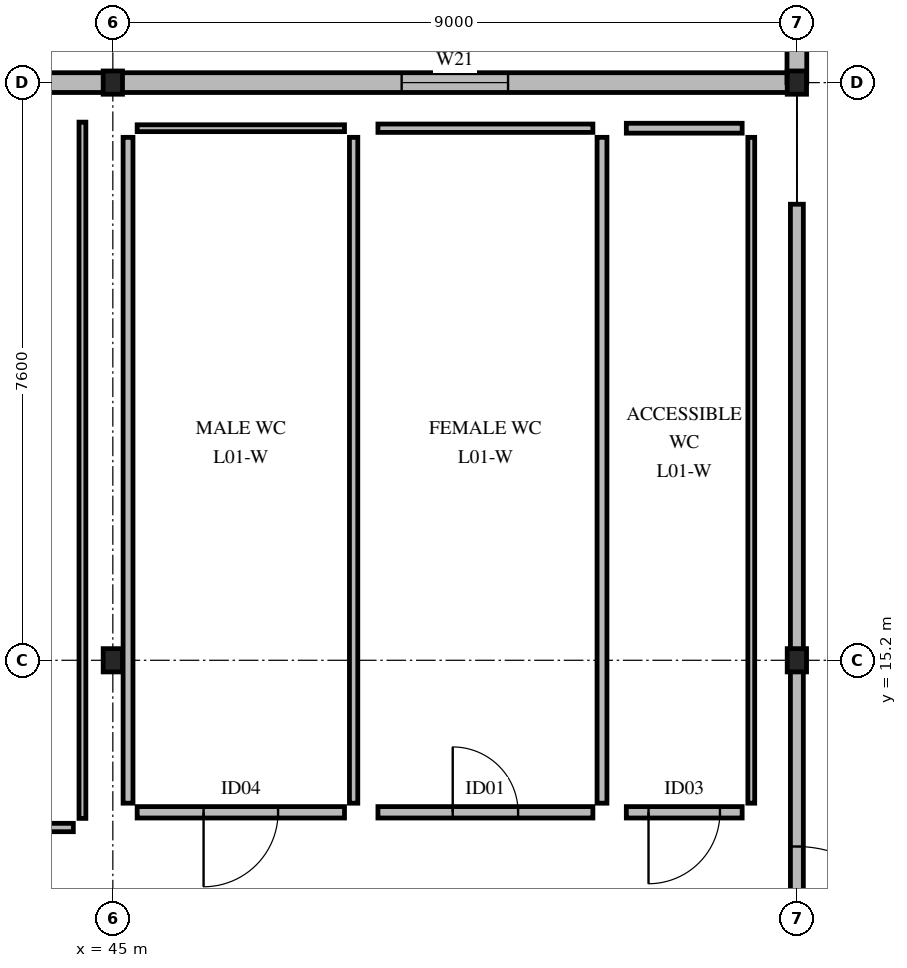
"""IFC4 building model, lengths in metres.
Left out: names, types, materials, properties, quantities, classifications, styles, units other than length and angle.
Written with IfcOpenShell. Run it as: python <this file> out.ifc"""

import sys

from ifc_helpers import new_model, si_unit, direction, frame, frame_2d, origin, origin_2d, place, context, subcontext, project, spatial, rectangle, i_section, extrude, element, fill, save


model = new_model("IFC4")
c1 = context("Model", 3, precision=1e-05, world=origin(), true_north=direction((0.0, 1.0)))
c2 = subcontext(c1, "Body", "Model", "MODEL_VIEW")
j1 = project(units=[si_unit("LENGTHUNIT", "METRE"), si_unit("PLANEANGLEUNIT", "RADIAN")], contexts=[c1])
p1 = place(None, origin())
s1 = spatial("IfcSite", under=j1, at=p1, CompositionType="ELEMENT")
p2 = place(p1, origin())
s2 = spatial("IfcBuilding", under=s1, at=p2, CompositionType="ELEMENT")
p3 = place(p2, frame((0.0, 0.0, 5.04)))
s3 = spatial("IfcBuildingStorey", under=s2, at=p3, CompositionType="ELEMENT", Elevation=5.04)
for number, where, z_axis, x_axis in (
    (1, (45.0, 15.2, 0.0), (0.0, 0.0, 1.0), (1.0, 0.0, 0.0)),
    (2, (45.0, 22.8, 0.0), (0.0, 0.0, 1.0), (1.0, 0.0, 0.0)),
    (3, (54.0, 15.2, 0.0), (0.0, 0.0, 1.0), (1.0, 0.0, 0.0)),
    (4, (54.0, 22.8, 0.0), (0.0, 0.0, 1.0), (1.0, 0.0, 0.0)),
):
    element("IfcColumn", number, at=place(p3, frame(where, z_axis=z_axis, x_axis=x_axis)), inside=s3, PredefinedType="COLUMN", context=c2, shape_type="SweptSolid", body=[
        extrude(i_section(OverallWidth=0.254, OverallDepth=0.306, WebThickness=0.009, FlangeThickness=0.015, FilletRadius=0.015, at=origin_2d()), origin(), (0.0, 0.0, 1.0), 4.32),
    ])
p4 = place(p3, frame((36.0, 22.8, 0.0), z_axis=(0.0, 0.0, 1.0), x_axis=(1.0, 0.0, 0.0)))
e5 = element("IfcWall", 5, at=p4, inside=s3, PredefinedType="STANDARD", context=c2, shape_type="SweptSolid", body=[
    extrude(rectangle(XDim=9.0, YDim=0.26, at=frame_2d((4.5, 0.0))), origin(), (0.0, 0.0, 1.0), 3.641),
])
p5 = place(p3, frame((45.0, 22.8, 0.0), z_axis=(0.0, 0.0, 1.0), x_axis=(1.0, 0.0, 0.0)))
e6 = element("IfcWall", 6, at=p5, inside=s3, PredefinedType="STANDARD", context=c2, shape_type="SweptSolid", body=[
    extrude(rectangle(XDim=9.0, YDim=0.26, at=frame_2d((4.5, 0.0))), origin(), (0.0, 0.0, 1.0), 3.641),
])
p6 = place(p5, frame((3.8, 0.0, 0.85)))
e7 = element("IfcOpeningElement", 7, at=p6, cuts=e6, PredefinedType="OPENING", context=c2, shape_type="SweptSolid", body=[
    extrude(rectangle(XDim=1.4, YDim=1.5, at=frame_2d((0.7, 0.75))), frame((0.0, 0.14, 0.0), z_axis=(0.0, -1.0, 0.0), x_axis=(1.0, 0.0, 0.0)), (0.0, 0.0, 1.0), 0.28),
])
p7 = place(p3, frame((54.0, 22.8, 0.0), z_axis=(0.0, 0.0, 1.0), x_axis=(0.0, 1.0, 0.0)))
e8 = element("IfcWall", 8, at=p7, inside=s3, PredefinedType="STANDARD", context=c2, shape_type="SweptSolid", body=[
    extrude(rectangle(XDim=7.81, YDim=0.26, at=frame_2d((3.905, 0.0))), origin(), (0.0, 0.0, 1.0), 3.629),
])
p8 = place(p7, frame((2.825, 0.0, 0.85)))
e9 = element("IfcOpeningElement", 9, at=p8, cuts=e8, PredefinedType="OPENING", context=c2, shape_type="SweptSolid", body=[
    extrude(rectangle(XDim=1.95, YDim=1.35, at=frame_2d((0.975, 0.675))), frame((0.0, 0.14, 0.0), z_axis=(0.0, -1.0, 0.0), x_axis=(1.0, 0.0, 0.0)), (0.0, 0.0, 1.0), 0.28),
])
p9 = place(p3, frame((54.0, 9.2, 0.0), z_axis=(0.0, 0.0, 1.0), x_axis=(0.0, 1.0, 0.0)))
e10 = element("IfcWall", 10, at=p9, inside=s3, PredefinedType="PARTITIONING", context=c2, shape_type="SweptSolid", body=[
    extrude(rectangle(XDim=12.0, YDim=0.17, at=frame_2d((6.0, 0.0))), origin(), (0.0, 0.0, 1.0), 3.599),
])
p10 = place(p9, frame((2.0, 0.0, 0.0)))
e11 = element("IfcOpeningElement", 11, at=p10, cuts=e10, PredefinedType="OPENING", context=c2, shape_type="SweptSolid", body=[
    extrude(rectangle(XDim=1.55, YDim=2.2, at=frame_2d((0.775, 1.1))), frame((0.0, 0.095, 0.0), z_axis=(0.0, -1.0, 0.0), x_axis=(1.0, 0.0, 0.0)), (0.0, 0.0, 1.0), 0.19),
])
p11 = place(p3, frame((0.52, 13.0, 0.0), z_axis=(0.0, 0.0, 1.0), x_axis=(1.0, 0.0, 0.0)))
e12 = element("IfcWall", 12, at=p11, inside=s3, PredefinedType="PARTITIONING", context=c2, shape_type="SweptSolid", body=[
    extrude(rectangle(XDim=43.96, YDim=0.11, at=frame_2d((21.98, 0.0))), origin(), (0.0, 0.0, 1.0), 4.04),
])
p12 = place(p11, frame((21.37, 0.0, 0.0)))
e13 = element("IfcOpeningElement", 13, at=p12, cuts=e12, PredefinedType="OPENING", context=c2, shape_type="SweptSolid", body=[
    extrude(rectangle(XDim=1.22, YDim=2.1, at=frame_2d((0.61, 1.05))), frame((0.0, 0.065, 0.0), z_axis=(0.0, -1.0, 0.0), x_axis=(1.0, 0.0, 0.0)), (0.0, 0.0, 1.0), 0.13),
])
p13 = place(p3, frame((44.6, 13.12, 0.0), z_axis=(0.0, 0.0, 1.0), x_axis=(0.0, 1.0, 0.0)))
e14 = element("IfcWall", 14, at=p13, inside=s3, PredefinedType="PARTITIONING", context=c2, shape_type="SweptSolid", body=[
    extrude(rectangle(XDim=9.16, YDim=0.09, at=frame_2d((4.58, 0.0))), origin(), (0.0, 0.0, 1.0), 4.04),
])
p14 = place(p3, frame((45.32, 13.2, 0.0), z_axis=(0.0, 0.0, 1.0), x_axis=(1.0, 0.0, 0.0)))
e15 = element("IfcWall", 15, at=p14, inside=s3, PredefinedType="PARTITIONING", context=c2, shape_type="SweptSolid", body=[
    extrude(rectangle(XDim=2.728, YDim=0.15, at=frame_2d((1.364, 0.0))), origin(), (0.0, 0.0, 1.0), 4.04),
])
p15 = place(p14, frame((0.874, 0.0, 0.0)))
e16 = element("IfcOpeningElement", 16, at=p15, cuts=e15, PredefinedType="OPENING", context=c2, shape_type="SweptSolid", body=[
    extrude(rectangle(XDim=0.98, YDim=2.06, at=frame_2d((0.49, 1.03))), frame((0.0, 0.085, 0.0), z_axis=(0.0, -1.0, 0.0), x_axis=(1.0, 0.0, 0.0)), (0.0, 0.0, 1.0), 0.17),
])
p16 = place(p3, frame((45.2, 13.32, 0.0), z_axis=(0.0, 0.0, 1.0), x_axis=(0.0, 1.0, 0.0)))
e17 = element("IfcWall", 17, at=p16, inside=s3, PredefinedType="PARTITIONING", context=c2, shape_type="SweptSolid", body=[
    extrude(rectangle(XDim=8.76, YDim=0.13, at=frame_2d((4.38, 0.0))), origin(), (0.0, 0.0, 1.0), 3.629),
])
p17 = place(p3, frame((48.168, 13.32, 0.0), z_axis=(0.0, 0.0, 1.0), x_axis=(0.0, 1.0, 0.0)))
e18 = element("IfcWall", 18, at=p17, inside=s3, PredefinedType="PARTITIONING", context=c2, shape_type="SweptSolid", body=[
    extrude(rectangle(XDim=8.76, YDim=0.11, at=frame_2d((4.38, 0.0))), origin(), (0.0, 0.0, 1.0), 4.04),
])
p18 = place(p3, frame((45.32, 22.2, 0.0), z_axis=(0.0, 0.0, 1.0), x_axis=(1.0, 0.0, 0.0)))
e19 = element("IfcWall", 19, at=p18, inside=s3, PredefinedType="PARTITIONING", context=c2, shape_type="SweptSolid", body=[
    extrude(rectangle(XDim=2.728, YDim=0.09, at=frame_2d((1.364, 0.0))), origin(), (0.0, 0.0, 1.0), 4.04),
])
p19 = place(p3, frame((48.488, 13.2, 0.0), z_axis=(0.0, 0.0, 1.0), x_axis=(1.0, 0.0, 0.0)))
e20 = element("IfcWall", 20, at=p19, inside=s3, PredefinedType="PARTITIONING", context=c2, shape_type="SweptSolid", body=[
    extrude(rectangle(XDim=2.828, YDim=0.15, at=frame_2d((1.414, 0.0))), origin(), (0.0, 0.0, 1.0), 4.04),
])
p20 = place(p19, frame((0.984, 0.0, 0.0)))
e21 = element("IfcOpeningElement", 21, at=p20, cuts=e20, PredefinedType="OPENING", context=c2, shape_type="SweptSolid", body=[
    extrude(rectangle(XDim=0.86, YDim=2.06, at=frame_2d((0.43, 1.03))), frame((0.0, 0.085, 0.0), z_axis=(0.0, -1.0, 0.0), x_axis=(1.0, 0.0, 0.0)), (0.0, 0.0, 1.0), 0.17),
])
p21 = place(p3, frame((51.436, 13.32, 0.0), z_axis=(0.0, 0.0, 1.0), x_axis=(0.0, 1.0, 0.0)))
e22 = element("IfcWall", 22, at=p21, inside=s3, PredefinedType="PARTITIONING", context=c2, shape_type="SweptSolid", body=[
    extrude(rectangle(XDim=8.76, YDim=0.13, at=frame_2d((4.38, 0.0))), origin(), (0.0, 0.0, 1.0), 4.04),
])
p22 = place(p3, frame((48.488, 22.2, 0.0), z_axis=(0.0, 0.0, 1.0), x_axis=(1.0, 0.0, 0.0)))
e23 = element("IfcWall", 23, at=p22, inside=s3, PredefinedType="PARTITIONING", context=c2, shape_type="SweptSolid", body=[
    extrude(rectangle(XDim=2.828, YDim=0.11, at=frame_2d((1.414, 0.0))), origin(), (0.0, 0.0, 1.0), 4.04),
])
p23 = place(p3, frame((53.4, 13.32, 0.0), z_axis=(0.0, 0.0, 1.0), x_axis=(0.0, 1.0, 0.0)))
e24 = element("IfcWall", 24, at=p23, inside=s3, PredefinedType="PARTITIONING", context=c2, shape_type="SweptSolid", body=[
    extrude(rectangle(XDim=8.76, YDim=0.09, at=frame_2d((4.38, 0.0))), origin(), (0.0, 0.0, 1.0), 4.04),
])
p24 = place(p3, frame((51.756, 13.2, 0.0), z_axis=(0.0, 0.0, 1.0), x_axis=(1.0, 0.0, 0.0)))
e25 = element("IfcWall", 25, at=p24, inside=s3, PredefinedType="PARTITIONING", context=c2, shape_type="SweptSolid", body=[
    extrude(rectangle(XDim=1.524, YDim=0.15, at=frame_2d((0.762, 0.0))), origin(), (0.0, 0.0, 1.0), 4.04),
])
p25 = place(p24, frame((0.292, 0.0, 0.0)))
e26 = element("IfcOpeningElement", 26, at=p25, cuts=e25, PredefinedType="OPENING", context=c2, shape_type="SweptSolid", body=[
    extrude(rectangle(XDim=0.94, YDim=2.06, at=frame_2d((0.47, 1.03))), frame((0.0, 0.085, 0.0), z_axis=(0.0, -1.0, 0.0), x_axis=(1.0, 0.0, 0.0)), (0.0, 0.0, 1.0), 0.17),
])
p26 = place(p3, frame((51.756, 22.2, 0.0), z_axis=(0.0, 0.0, 1.0), x_axis=(1.0, 0.0, 0.0)))
e27 = element("IfcWall", 27, at=p26, inside=s3, PredefinedType="PARTITIONING", context=c2, shape_type="SweptSolid", body=[
    extrude(rectangle(XDim=1.524, YDim=0.13, at=frame_2d((0.762, 0.0))), origin(), (0.0, 0.0, 1.0), 4.04),
])
p27 = place(p6, origin())
e28 = element("IfcWindow", 28, at=p27, inside=s3, PartitioningType="SINGLE_PANEL", PredefinedType="WINDOW", context=c2, shape_type="SweptSolid", body=[
    extrude(rectangle(XDim=1.4, YDim=1.5, at=frame_2d((0.7, 0.75))), frame((0.0, 0.03, 0.0), z_axis=(0.0, -1.0, 0.0), x_axis=(1.0, 0.0, 0.0)), (0.0, 0.0, 1.0), 0.06),
])
fill(e7, e28)
p28 = place(p10, origin())
e29 = element("IfcDoor", 29, at=p28, inside=s3, OperationType="SINGLE_SWING_RIGHT", PredefinedType="DOOR", context=c2, shape_type="SweptSolid", body=[
    extrude(rectangle(XDim=1.55, YDim=2.2, at=frame_2d((0.775, 1.1))), frame((0.0, 0.025, 0.0), z_axis=(0.0, -1.0, 0.0), x_axis=(1.0, 0.0, 0.0)), (0.0, 0.0, 1.0), 0.05),
])
fill(e11, e29)
p29 = place(p15, origin())
e30 = element("IfcDoor", 30, at=p29, inside=s3, OperationType="SINGLE_SWING_RIGHT", PredefinedType="DOOR", context=c2, shape_type="SweptSolid", body=[
    extrude(rectangle(XDim=0.98, YDim=2.06, at=frame_2d((0.49, 1.03))), frame((0.0, 0.025, 0.0), z_axis=(0.0, -1.0, 0.0), x_axis=(1.0, 0.0, 0.0)), (0.0, 0.0, 1.0), 0.05),
])
fill(e16, e30)
p30 = place(p20, origin())
e31 = element("IfcDoor", 31, at=p30, inside=s3, OperationType="SINGLE_SWING_LEFT", PredefinedType="DOOR", context=c2, shape_type="SweptSolid", body=[
    extrude(rectangle(XDim=0.86, YDim=2.06, at=frame_2d((0.43, 1.03))), frame((0.0, 0.025, 0.0), z_axis=(0.0, -1.0, 0.0), x_axis=(1.0, 0.0, 0.0)), (0.0, 0.0, 1.0), 0.05),
])
fill(e21, e31)
p31 = place(p25, origin())
e32 = element("IfcDoor", 32, at=p31, inside=s3, OperationType="SINGLE_SWING_RIGHT", PredefinedType="DOOR", context=c2, shape_type="SweptSolid", body=[
    extrude(rectangle(XDim=0.94, YDim=2.06, at=frame_2d((0.47, 1.03))), frame((0.0, 0.025, 0.0), z_axis=(0.0, -1.0, 0.0), x_axis=(1.0, 0.0, 0.0)), (0.0, 0.0, 1.0), 0.05),
])
fill(e26, e32)
save(model, sys.argv[1])
